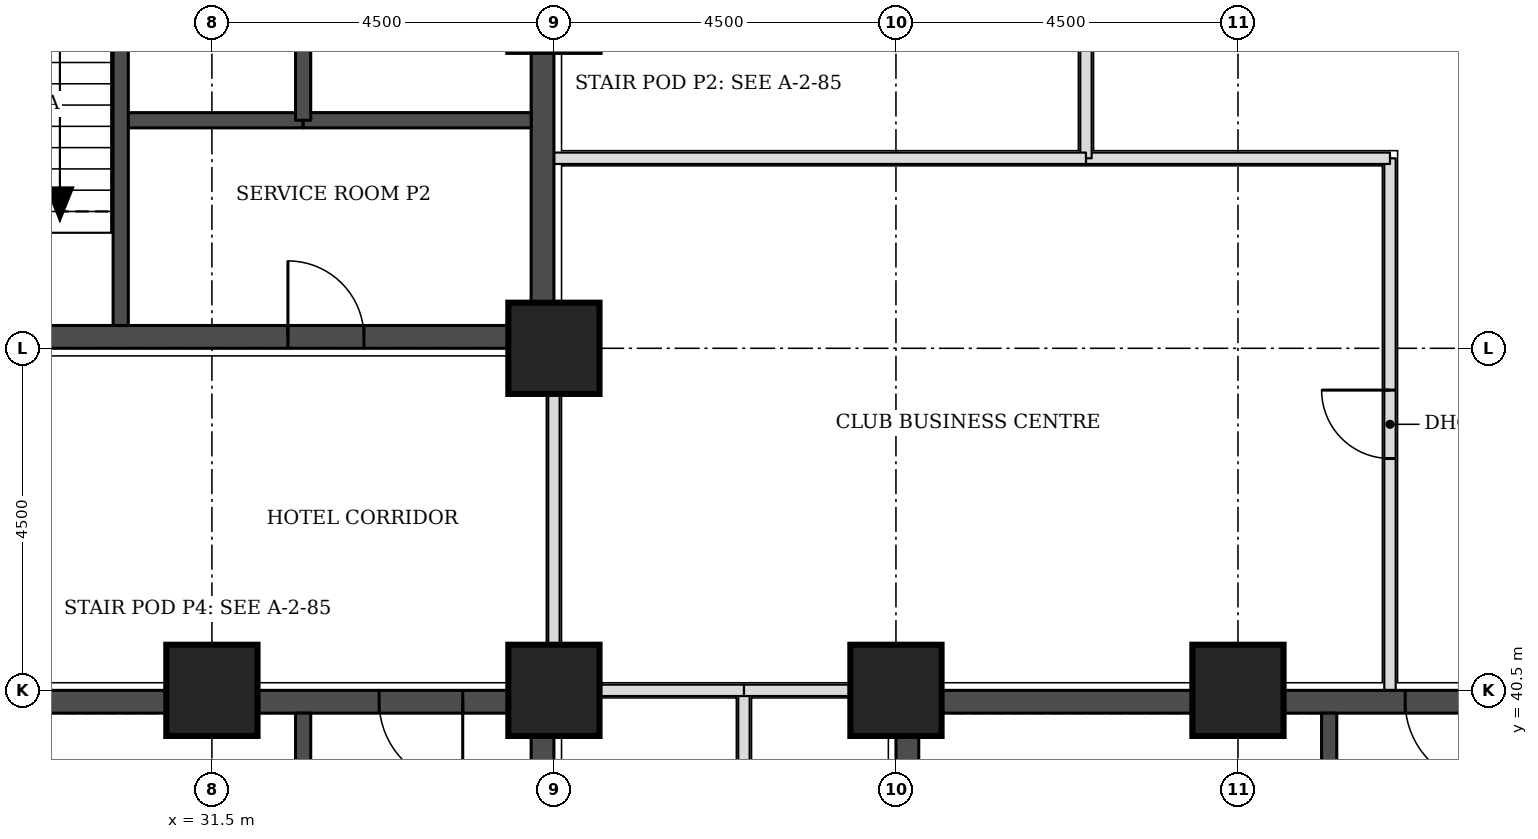
"""IFC4 building model, lengths in metres.
Left out: names, types, materials, properties, quantities, classifications, styles, units other than length and angle.
Written with IfcOpenShell. Run it as: python <this file> out.ifc"""

import sys

from ifc_helpers import new_model, si_unit, direction, frame, frame_2d, origin, origin_2d, place, context, subcontext, project, spatial, rectangle, extrude, element, fill, save


model = new_model("IFC4")
c1 = context("Model", 3, precision=1e-05, world=origin(), true_north=direction((0.0, 1.0)))
c2 = subcontext(c1, "Body", "Model", "MODEL_VIEW")
j1 = project(units=[si_unit("LENGTHUNIT", "METRE"), si_unit("PLANEANGLEUNIT", "RADIAN")], contexts=[c1])
p1 = place(None, origin())
s1 = spatial("IfcSite", under=j1, at=p1, CompositionType="ELEMENT")
p2 = place(p1, origin())
s2 = spatial("IfcBuilding", under=s1, at=p2, CompositionType="ELEMENT")
p3 = place(p2, frame((0.0, 0.0, 66.0)))
s3 = spatial("IfcBuildingStorey", under=s2, at=p3, CompositionType="ELEMENT", Elevation=66.0)
for number, where, z_axis, x_axis in (
    (1, (31.5, 40.5, 0.0), (0.0, 0.0, 1.0), (1.0, 0.0, 0.0)),
    (2, (36.0, 40.5, 0.0), (0.0, 0.0, 1.0), (1.0, 0.0, 0.0)),
    (3, (40.5, 40.5, 0.0), (0.0, 0.0, 1.0), (1.0, 0.0, 0.0)),
    (4, (45.0, 40.5, 0.0), (0.0, 0.0, 1.0), (1.0, 0.0, 0.0)),
    (5, (36.0, 45.0, 0.0), (0.0, 0.0, 1.0), (1.0, 0.0, 0.0)),
):
    element("IfcColumn", number, at=place(p3, frame(where, z_axis=z_axis, x_axis=x_axis)), inside=s3, PredefinedType="COLUMN", context=c2, shape_type="SweptSolid", body=[
        extrude(rectangle(XDim=1.2, YDim=1.2, at=origin_2d()), origin(), (0.0, 0.0, 1.0), 3.3),
    ])
p4 = place(p3, frame((27.3, 45.15, 0.0), z_axis=(0.0, 0.0, 1.0), x_axis=(1.0, 0.0, 0.0)))
e6 = element("IfcWall", 6, at=p4, inside=s3, PredefinedType="SHEAR", context=c2, shape_type="SweptSolid", body=[
    extrude(rectangle(XDim=8.4, YDim=0.3, at=frame_2d((4.2, 0.0))), origin(), (0.0, 0.0, 1.0), 3.3),
])
p5 = place(p4, frame((5.2, 0.0, 0.0)))
e7 = element("IfcOpeningElement", 7, at=p5, cuts=e6, PredefinedType="OPENING", context=c2, shape_type="SweptSolid", body=[
    extrude(rectangle(XDim=1.0, YDim=2.1, at=frame_2d((0.5, 1.05))), frame((0.0, 0.16, 0.0), z_axis=(0.0, -1.0, 0.0), x_axis=(1.0, 0.0, 0.0)), (0.0, 0.0, 1.0), 0.32),
])
p6 = place(p3, frame((35.85, 45.0, 0.0), z_axis=(0.0, 0.0, 1.0), x_axis=(0.0, 1.0, 0.0)))
e8 = element("IfcWall", 8, at=p6, inside=s3, PredefinedType="SHEAR", context=c2, shape_type="SweptSolid", body=[
    extrude(rectangle(XDim=9.0, YDim=0.3, at=frame_2d((4.5, 0.0))), origin(), (0.0, 0.0, 1.0), 3.3),
])
p7 = place(p3, frame((40.8, 40.35, 0.0), z_axis=(0.0, 0.0, 1.0), x_axis=(1.0, 0.0, 0.0)))
e9 = element("IfcWall", 9, at=p7, inside=s3, PredefinedType="SHEAR", context=c2, shape_type="SweptSolid", body=[
    extrude(rectangle(XDim=8.4, YDim=0.3, at=frame_2d((4.2, 0.0))), origin(), (0.0, 0.0, 1.0), 3.3),
])
p8 = place(p7, frame((6.4, 0.0, 0.0)))
e10 = element("IfcOpeningElement", 10, at=p8, cuts=e9, PredefinedType="OPENING", context=c2, shape_type="SweptSolid", body=[
    extrude(rectangle(XDim=1.1, YDim=2.1, at=frame_2d((0.55, 1.05))), frame((0.0, 0.16, 0.0), z_axis=(0.0, -1.0, 0.0), x_axis=(1.0, 0.0, 0.0)), (0.0, 0.0, 1.0), 0.32),
])
p9 = place(p3, frame((40.65, 31.5, 0.0), z_axis=(0.0, 0.0, 1.0), x_axis=(0.0, 1.0, 0.0)))
e11 = element("IfcWall", 11, at=p9, inside=s3, PredefinedType="SHEAR", context=c2, shape_type="SweptSolid", body=[
    extrude(rectangle(XDim=9.0, YDim=0.3, at=frame_2d((4.5, 0.0))), origin(), (0.0, 0.0, 1.0), 3.3),
])
p10 = place(p9, frame((0.4, 0.0, 0.0)))
e12 = element("IfcOpeningElement", 12, at=p10, cuts=e11, PredefinedType="OPENING", context=c2, shape_type="SweptSolid", body=[
    extrude(rectangle(XDim=1.1, YDim=2.1, at=frame_2d((0.55, 1.05))), frame((0.0, 0.16, 0.0), z_axis=(0.0, -1.0, 0.0), x_axis=(1.0, 0.0, 0.0)), (0.0, 0.0, 1.0), 0.32),
])
p11 = place(p3, frame((27.3, 40.35, 0.0), z_axis=(0.0, 0.0, 1.0), x_axis=(1.0, 0.0, 0.0)))
e13 = element("IfcWall", 13, at=p11, inside=s3, PredefinedType="SHEAR", context=c2, shape_type="SweptSolid", body=[
    extrude(rectangle(XDim=8.4, YDim=0.3, at=frame_2d((4.2, 0.0))), origin(), (0.0, 0.0, 1.0), 3.3),
])
p12 = place(p11, frame((6.4, 0.0, 0.0)))
e14 = element("IfcOpeningElement", 14, at=p12, cuts=e13, PredefinedType="OPENING", context=c2, shape_type="SweptSolid", body=[
    extrude(rectangle(XDim=1.1, YDim=2.1, at=frame_2d((0.55, 1.05))), frame((0.0, 0.16, 0.0), z_axis=(0.0, -1.0, 0.0), x_axis=(1.0, 0.0, 0.0)), (0.0, 0.0, 1.0), 0.32),
])
p13 = place(p3, frame((35.85, 31.5, 0.0), z_axis=(0.0, 0.0, 1.0), x_axis=(0.0, 1.0, 0.0)))
e15 = element("IfcWall", 15, at=p13, inside=s3, PredefinedType="SHEAR", context=c2, shape_type="SweptSolid", body=[
    extrude(rectangle(XDim=9.0, YDim=0.3, at=frame_2d((4.5, 0.0))), origin(), (0.0, 0.0, 1.0), 3.3),
])
p14 = place(p3, frame((38.5, 26.4, 0.0), z_axis=(0.0, 0.0, 1.0), x_axis=(0.0, 1.0, 0.0)))
e16 = element("IfcWall", 16, at=p14, inside=s3, PredefinedType="PARTITIONING", context=c2, shape_type="SweptSolid", body=[
    extrude(rectangle(XDim=14.1, YDim=0.15, at=frame_2d((7.05, 0.0))), origin(), (0.0, 0.0, 1.0), 3.08),
])
p15 = place(p14, frame((6.6, 0.0, 0.0)))
e17 = element("IfcOpeningElement", 17, at=p15, cuts=e16, PredefinedType="OPENING", context=c2, shape_type="SweptSolid", body=[
    extrude(rectangle(XDim=0.9, YDim=2.1, at=frame_2d((0.45, 1.05))), frame((0.0, 0.085, 0.0), z_axis=(0.0, -1.0, 0.0), x_axis=(1.0, 0.0, 0.0)), (0.0, 0.0, 1.0), 0.17),
])
p16 = place(p3, frame((38.5, 40.5, 0.0), z_axis=(0.0, 0.0, 1.0), x_axis=(1.0, 0.0, 0.0)))
e18 = element("IfcWall", 18, at=p16, inside=s3, PredefinedType="PARTITIONING", context=c2, shape_type="SweptSolid", body=[
    extrude(rectangle(XDim=1.95, YDim=0.15, at=frame_2d((0.975, 0.0))), origin(), (0.0, 0.0, 1.0), 2.33),
])
p17 = place(p3, frame((36.0, 40.55, 0.0), z_axis=(0.0, 0.0, 1.0), x_axis=(0.0, 1.0, 0.0)))
e19 = element("IfcWall", 19, at=p17, inside=s3, PredefinedType="PARTITIONING", context=c2, shape_type="SweptSolid", body=[
    extrude(rectangle(XDim=4.4, YDim=0.15, at=frame_2d((2.2, 0.0))), origin(), (0.0, 0.0, 1.0), 2.33),
])
p18 = place(p3, frame((47.0, 40.5, 0.0), z_axis=(0.0, 0.0, 1.0), x_axis=(0.0, 1.0, 0.0)))
e20 = element("IfcWall", 20, at=p18, inside=s3, PredefinedType="PARTITIONING", context=c2, shape_type="SweptSolid", body=[
    extrude(rectangle(XDim=7.0, YDim=0.15, at=frame_2d((3.5, 0.0))), origin(), (0.0, 0.0, 1.0), 3.08),
])
p19 = place(p18, frame((3.05, 0.0, 0.0)))
e21 = element("IfcOpeningElement", 21, at=p19, cuts=e20, PredefinedType="OPENING", context=c2, shape_type="SweptSolid", body=[
    extrude(rectangle(XDim=0.9, YDim=2.1, at=frame_2d((0.45, 1.05))), frame((0.0, 0.085, 0.0), z_axis=(0.0, -1.0, 0.0), x_axis=(1.0, 0.0, 0.0)), (0.0, 0.0, 1.0), 0.17),
])
p20 = place(p3, frame((43.0, 47.5, 0.0), z_axis=(0.0, 0.0, 1.0), x_axis=(1.0, 0.0, 0.0)))
e22 = element("IfcWall", 22, at=p20, inside=s3, PredefinedType="PARTITIONING", context=c2, shape_type="SweptSolid", body=[
    extrude(rectangle(XDim=4.0, YDim=0.15, at=frame_2d((2.0, 0.0))), origin(), (0.0, 0.0, 1.0), 3.08),
])
p21 = place(p3, frame((43.0, 47.5, 0.0), z_axis=(0.0, 0.0, 1.0), x_axis=(0.0, 1.0, 0.0)))
e23 = element("IfcWall", 23, at=p21, inside=s3, PredefinedType="PARTITIONING", context=c2, shape_type="SweptSolid", body=[
    extrude(rectangle(XDim=7.1, YDim=0.15, at=frame_2d((3.55, 0.0))), origin(), (0.0, 0.0, 1.0), 3.08),
])
p22 = place(p21, frame((3.1, 0.0, 0.0)))
e24 = element("IfcOpeningElement", 24, at=p22, cuts=e23, PredefinedType="OPENING", context=c2, shape_type="SweptSolid", body=[
    extrude(rectangle(XDim=0.9, YDim=2.1, at=frame_2d((0.45, 1.05))), frame((0.0, 0.085, 0.0), z_axis=(0.0, -1.0, 0.0), x_axis=(1.0, 0.0, 0.0)), (0.0, 0.0, 1.0), 0.17),
])
p23 = place(p3, frame((36.05, 40.5, 0.0), z_axis=(0.0, 0.0, 1.0), x_axis=(1.0, 0.0, 0.0)))
e25 = element("IfcWall", 25, at=p23, inside=s3, PredefinedType="PARTITIONING", context=c2, shape_type="SweptSolid", body=[
    extrude(rectangle(XDim=2.45, YDim=0.15, at=frame_2d((1.225, 0.0))), origin(), (0.0, 0.0, 1.0), 2.33),
])
p24 = place(p3, frame((36.0, 47.5, 0.0), z_axis=(0.0, 0.0, 1.0), x_axis=(1.0, 0.0, 0.0)))
e26 = element("IfcWall", 26, at=p24, inside=s3, PredefinedType="PARTITIONING", context=c2, shape_type="SweptSolid", body=[
    extrude(rectangle(XDim=7.0, YDim=0.15, at=frame_2d((3.5, 0.0))), origin(), (0.0, 0.0, 1.0), 3.08),
])
p25 = place(p3, frame((30.3, 48.0, 0.0), z_axis=(0.0, 0.0, 1.0), x_axis=(1.0, 0.0, 0.0)))
e27 = element("IfcWall", 27, at=p25, inside=s3, PredefinedType="SOLIDWALL", context=c2, shape_type="SweptSolid", body=[
    extrude(rectangle(XDim=2.4, YDim=0.2, at=frame_2d((1.2, 0.0))), origin(), (0.0, 0.0, 1.0), 3.08),
])
p26 = place(p3, frame((32.7, 48.0, 0.0), z_axis=(0.0, 0.0, 1.0), x_axis=(1.0, 0.0, 0.0)))
e28 = element("IfcWall", 28, at=p26, inside=s3, PredefinedType="SOLIDWALL", context=c2, shape_type="SweptSolid", body=[
    extrude(rectangle(XDim=3.0, YDim=0.2, at=frame_2d((1.5, 0.0))), origin(), (0.0, 0.0, 1.0), 3.08),
])
for number, where, z_axis, x_axis in (
    (29, (30.3, 45.3, 0.0), (0.0, 0.0, 1.0), (0.0, 1.0, 0.0)),
    (30, (32.7, 48.0, 0.0), (0.0, 0.0, 1.0), (0.0, 1.0, 0.0)),
    (31, (46.2, 34.5, 0.0), (0.0, 0.0, 1.0), (0.0, 1.0, 0.0)),
    (32, (32.7, 34.5, 0.0), (0.0, 0.0, 1.0), (0.0, 1.0, 0.0)),
):
    element("IfcWall", number, at=place(p3, frame(where, z_axis=z_axis, x_axis=x_axis)), inside=s3, PredefinedType="SOLIDWALL", context=c2, shape_type="SweptSolid", body=[
        extrude(rectangle(XDim=5.7, YDim=0.2, at=frame_2d((2.85, 0.0))), origin(), (0.0, 0.0, 1.0), 3.08),
    ])
p27 = place(p19, origin())
e33 = element("IfcDoor", 33, at=p27, inside=s3, OperationType="SINGLE_SWING_RIGHT", PredefinedType="DOOR", context=c2, shape_type="SweptSolid", body=[
    extrude(rectangle(XDim=0.9, YDim=2.1, at=frame_2d((0.45, 1.05))), frame((0.0, 0.025, 0.0), z_axis=(0.0, -1.0, 0.0), x_axis=(1.0, 0.0, 0.0)), (0.0, 0.0, 1.0), 0.05),
])
fill(e21, e33)
p28 = place(p5, origin())
e34 = element("IfcDoor", 34, at=p28, inside=s3, OperationType="SINGLE_SWING_LEFT", PredefinedType="DOOR", context=c2, shape_type="SweptSolid", body=[
    extrude(rectangle(XDim=1.0, YDim=2.1, at=frame_2d((0.5, 1.05))), frame((0.0, 0.025, 0.0), z_axis=(0.0, -1.0, 0.0), x_axis=(1.0, 0.0, 0.0)), (0.0, 0.0, 1.0), 0.05),
])
fill(e7, e34)
p29 = place(p8, frame((1.1, 0.0, 0.0), z_axis=(0.0, 0.0, 1.0), x_axis=(-1.0, 0.0, 0.0)))
e35 = element("IfcDoor", 35, at=p29, inside=s3, OperationType="SINGLE_SWING_LEFT", PredefinedType="DOOR", context=c2, shape_type="SweptSolid", body=[
    extrude(rectangle(XDim=1.1, YDim=2.1, at=frame_2d((0.55, 1.05))), frame((0.0, 0.025, 0.0), z_axis=(0.0, -1.0, 0.0), x_axis=(1.0, 0.0, 0.0)), (0.0, 0.0, 1.0), 0.05),
])
fill(e10, e35)
p30 = place(p12, frame((1.1, 0.0, 0.0), z_axis=(0.0, 0.0, 1.0), x_axis=(-1.0, 0.0, 0.0)))
e36 = element("IfcDoor", 36, at=p30, inside=s3, OperationType="SINGLE_SWING_LEFT", PredefinedType="DOOR", context=c2, shape_type="SweptSolid", body=[
    extrude(rectangle(XDim=1.1, YDim=2.1, at=frame_2d((0.55, 1.05))), frame((0.0, 0.025, 0.0), z_axis=(0.0, -1.0, 0.0), x_axis=(1.0, 0.0, 0.0)), (0.0, 0.0, 1.0), 0.05),
])
fill(e14, e36)
save(model, sys.argv[1])
